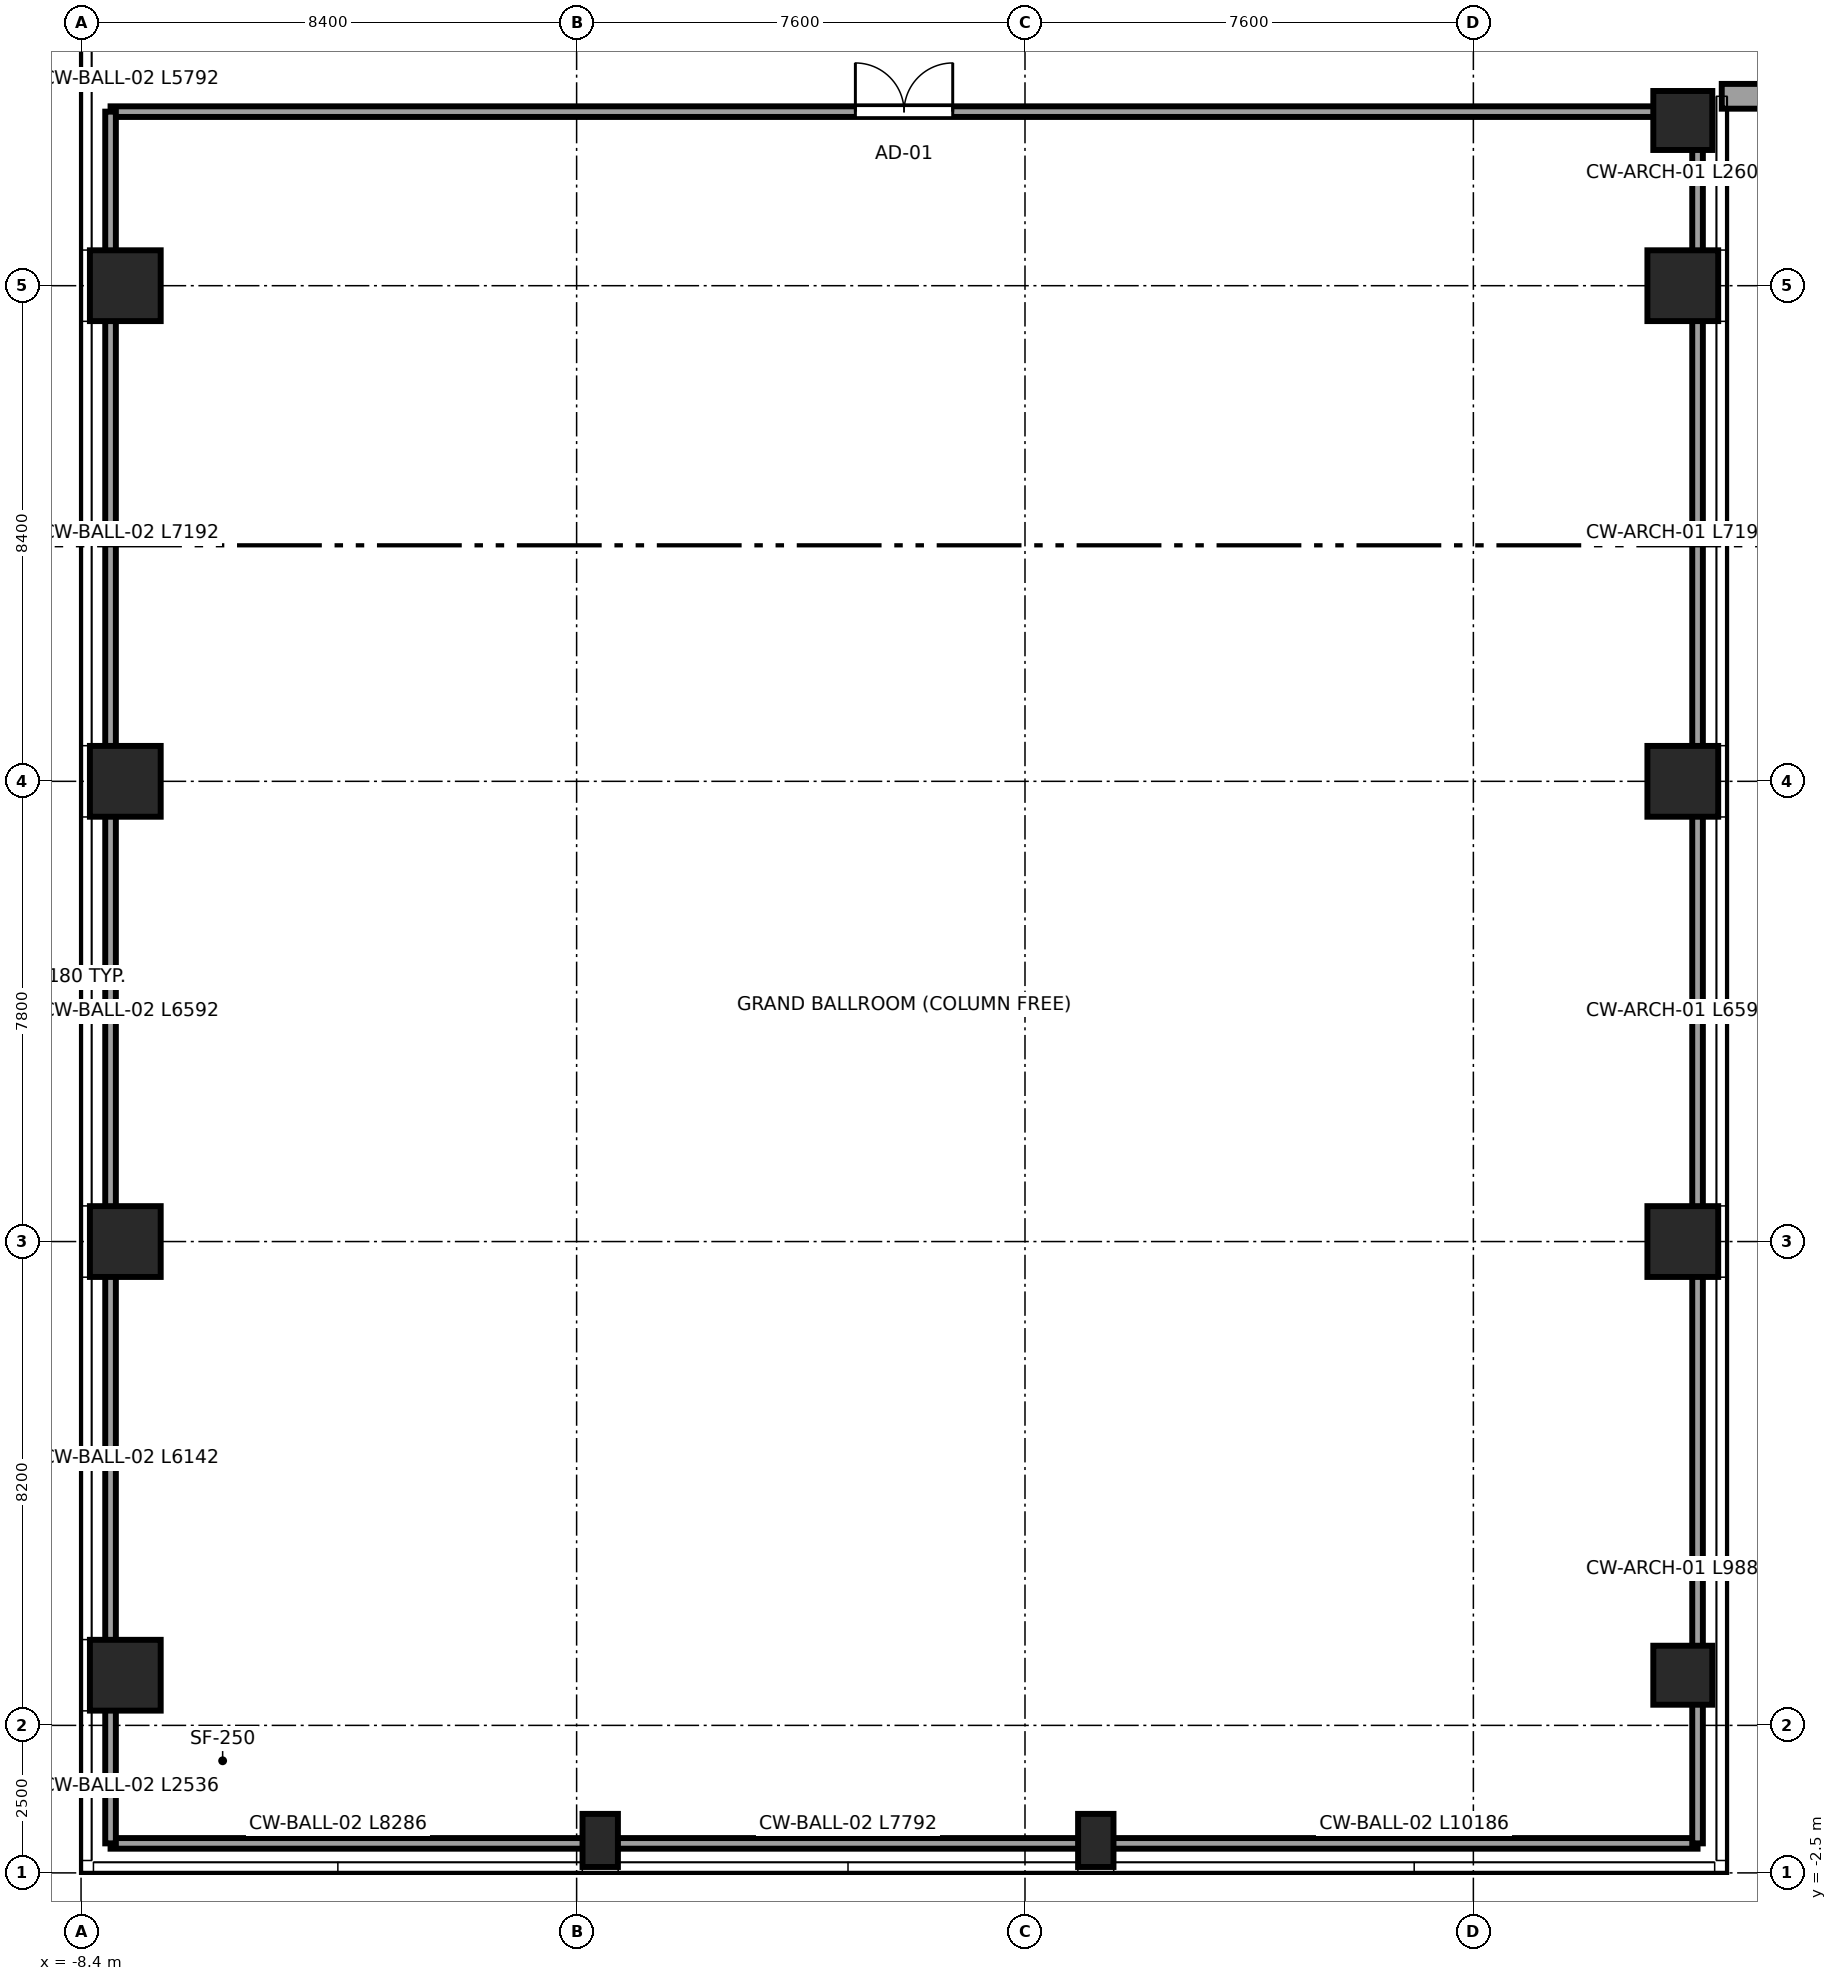
"""IFC4 building model, lengths in metres.
Left out: names, types, materials, properties, quantities, classifications, styles, units other than length and angle.
Written with IfcOpenShell. Run it as: python <this file> out.ifc"""

import sys

from ifc_helpers import new_model, si_unit, direction, frame, frame_2d, origin, origin_2d, place, context, subcontext, project, spatial, rectangle, circle, extrude, source, transform, mapped, element, fill, save


model = new_model("IFC4")
c1 = context("Model", 3, precision=1e-05, world=origin(), true_north=direction((0.0, 1.0)))
c2 = subcontext(c1, "Body", "Model", "MODEL_VIEW")
j1 = project(units=[si_unit("LENGTHUNIT", "METRE"), si_unit("PLANEANGLEUNIT", "RADIAN")], contexts=[c1])
p1 = place(None, origin())
s1 = spatial("IfcSite", under=j1, at=p1, CompositionType="ELEMENT")
p2 = place(p1, origin())
s2 = spatial("IfcBuilding", under=s1, at=p2, CompositionType="ELEMENT")
p3 = place(p2, frame((0.0, 0.0, 16.0)))
s3 = spatial("IfcBuildingStorey", under=s2, at=p3, CompositionType="ELEMENT", Elevation=16.0)
m1 = source(origin(), c2, "Body", "SweptSolid", [
    extrude(rectangle(XDim=1.2, YDim=1.2, at=origin_2d()), origin(), (0.0, 0.0, 1.0), 6.4),
])
for number, where, z_axis, x_axis in (
    (1, (-7.65, 0.85, 0.0), (0.0, 0.0, 1.0), (1.0, 0.0, 0.0)),
    (2, (-7.65, 8.2, 0.0), (0.0, 0.0, 1.0), (1.0, 0.0, 0.0)),
    (3, (-7.65, 16.0, 0.0), (0.0, 0.0, 1.0), (1.0, 0.0, 0.0)),
    (4, (-7.65, 24.4, 0.0), (0.0, 0.0, 1.0), (1.0, 0.0, 0.0)),
):
    element("IfcColumn", number, at=place(p3, frame(where, z_axis=z_axis, x_axis=x_axis)), inside=s3, PredefinedType="COLUMN", context=c2, shape_type="MappedRepresentation", body=[
        mapped(m1, transform((0.0, 0.0, 0.0), x_axis=(1.0, 0.0, 0.0), y_axis=(0.0, 1.0, 0.0), z_axis=(0.0, 0.0, 1.0), scale=1.0)),
    ])
m2 = source(origin(), c2, "Body", "SweptSolid", [
    extrude(circle(Radius=0.5, at=origin_2d()), origin(), (0.0, 0.0, 1.0), 6.4),
])
p4 = place(p3, frame((18.75, 0.85, 0.0), z_axis=(0.0, 0.0, 1.0), x_axis=(1.0, 0.0, 0.0)))
e5 = element("IfcColumn", 5, at=p4, inside=s3, PredefinedType="COLUMN", context=c2, shape_type="MappedRepresentation", body=[
    mapped(m2, transform((0.0, 0.0, 0.0), x_axis=(1.0, 0.0, 0.0), y_axis=(0.0, 1.0, 0.0), z_axis=(0.0, 0.0, 1.0), scale=1.0)),
])
for number, where, z_axis, x_axis in (
    (6, (18.75, 8.2, 0.0), (0.0, 0.0, 1.0), (1.0, 0.0, 0.0)),
    (7, (18.75, 16.0, 0.0), (0.0, 0.0, 1.0), (1.0, 0.0, 0.0)),
    (8, (18.75, 24.4, 0.0), (0.0, 0.0, 1.0), (1.0, 0.0, 0.0)),
):
    element("IfcColumn", number, at=place(p3, frame(where, z_axis=z_axis, x_axis=x_axis)), inside=s3, PredefinedType="COLUMN", context=c2, shape_type="MappedRepresentation", body=[
        mapped(m1, transform((0.0, 0.0, 0.0), x_axis=(1.0, 0.0, 0.0), y_axis=(0.0, 1.0, 0.0), z_axis=(0.0, 0.0, 1.0), scale=1.0)),
    ])
p5 = place(p3, frame((18.75, 27.2, 0.0), z_axis=(0.0, 0.0, 1.0), x_axis=(1.0, 0.0, 0.0)))
e9 = element("IfcColumn", 9, at=p5, inside=s3, PredefinedType="COLUMN", context=c2, shape_type="MappedRepresentation", body=[
    mapped(m2, transform((0.0, 0.0, 0.0), x_axis=(1.0, 0.0, 0.0), y_axis=(0.0, 1.0, 0.0), z_axis=(0.0, 0.0, 1.0), scale=1.0)),
])
m3 = source(origin(), c2, "Body", "SweptSolid", [
    extrude(rectangle(XDim=0.6, YDim=0.9, at=origin_2d()), origin(), (0.0, 0.0, 1.0), 6.4),
])
for number, where, z_axis, x_axis in (
    (10, (0.4, -1.95, 0.0), (0.0, 0.0, 1.0), (1.0, 0.0, 0.0)),
    (11, (8.8, -1.95, 0.0), (0.0, 0.0, 1.0), (1.0, 0.0, 0.0)),
):
    element("IfcColumn", number, at=place(p3, frame(where, z_axis=z_axis, x_axis=x_axis)), inside=s3, PredefinedType="PILASTER", context=c2, shape_type="MappedRepresentation", body=[
        mapped(m3, transform((0.0, 0.0, 0.0), x_axis=(1.0, 0.0, 0.0), y_axis=(0.0, 1.0, 0.0), z_axis=(0.0, 0.0, 1.0), scale=1.0)),
    ])
p6 = place(p3, frame((19.41, 27.61, 0.0), z_axis=(0.0, 0.0, 1.0), x_axis=(1.0, 0.0, 0.0)))
e12 = element("IfcWall", 12, at=p6, inside=s3, PredefinedType="SOLIDWALL", context=c2, shape_type="SweptSolid", body=[
    extrude(rectangle(XDim=18.18, YDim=0.42, at=frame_2d((9.09, 0.0))), origin(), (0.0, 0.0, 1.0), 3.73),
])
p7 = place(p6, frame((1.93, 0.0, 0.65)))
e13 = element("IfcOpeningElement", 13, at=p7, cuts=e12, PredefinedType="OPENING", context=c2, shape_type="SweptSolid", body=[
    extrude(rectangle(XDim=3.0, YDim=2.5, at=frame_2d((1.5, 1.25))), frame((0.0, 0.22, 0.0), z_axis=(0.0, -1.0, 0.0), x_axis=(1.0, 0.0, 0.0)), (0.0, 0.0, 1.0), 0.44),
])
p8 = place(p6, frame((7.59, 0.0, 0.65)))
e14 = element("IfcOpeningElement", 14, at=p8, cuts=e12, PredefinedType="OPENING", context=c2, shape_type="SweptSolid", body=[
    extrude(rectangle(XDim=3.0, YDim=2.5, at=frame_2d((1.5, 1.25))), frame((0.0, 0.22, 0.0), z_axis=(0.0, -1.0, 0.0), x_axis=(1.0, 0.0, 0.0)), (0.0, 0.0, 1.0), 0.44),
])
p9 = place(p6, frame((13.25, 0.0, 0.65)))
e15 = element("IfcOpeningElement", 15, at=p9, cuts=e12, PredefinedType="OPENING", context=c2, shape_type="SweptSolid", body=[
    extrude(rectangle(XDim=3.0, YDim=2.5, at=frame_2d((1.5, 1.25))), frame((0.0, 0.22, 0.0), z_axis=(0.0, -1.0, 0.0), x_axis=(1.0, 0.0, 0.0)), (0.0, 0.0, 1.0), 0.44),
])
p10 = place(p3, frame((-7.9, -2.0, 0.0), z_axis=(0.0, 0.0, 1.0), x_axis=(1.0, 0.0, 0.0)))
e16 = element("IfcWall", 16, at=p10, inside=s3, PredefinedType="PARTITIONING", context=c2, shape_type="SweptSolid", body=[
    extrude(rectangle(XDim=26.9, YDim=0.18, at=frame_2d((13.45, 0.0))), origin(), (0.0, 0.0, 1.0), 5.43),
])
p11 = place(p3, frame((-7.9, 27.35, 0.0), z_axis=(0.0, 0.0, 1.0), x_axis=(1.0, 0.0, 0.0)))
e17 = element("IfcWall", 17, at=p11, inside=s3, PredefinedType="PARTITIONING", context=c2, shape_type="SweptSolid", body=[
    extrude(rectangle(XDim=26.9, YDim=0.18, at=frame_2d((13.45, 0.0))), origin(), (0.0, 0.0, 1.0), 3.73),
])
p12 = place(p11, frame((12.625, 0.0, 0.0)))
e18 = element("IfcOpeningElement", 18, at=p12, cuts=e17, PredefinedType="OPENING", context=c2, shape_type="SweptSolid", body=[
    extrude(rectangle(XDim=1.65, YDim=2.15, at=frame_2d((0.825, 1.075))), frame((0.0, 0.1, 0.0), z_axis=(0.0, -1.0, 0.0), x_axis=(1.0, 0.0, 0.0)), (0.0, 0.0, 1.0), 0.2),
])
for number, where, z_axis, x_axis in (
    (19, (-7.9, -2.0, 0.0), (0.0, 0.0, 1.0), (0.0, 1.0, 0.0)),
    (20, (19.0, -2.0, 0.0), (0.0, 0.0, 1.0), (0.0, 1.0, 0.0)),
):
    element("IfcWall", number, at=place(p3, frame(where, z_axis=z_axis, x_axis=x_axis)), inside=s3, PredefinedType="PARTITIONING", context=c2, shape_type="SweptSolid", body=[
        extrude(rectangle(XDim=29.35, YDim=0.18, at=frame_2d((14.675, 0.0))), origin(), (0.0, 0.0, 1.0), 6.14),
    ])
m4 = source(origin(), c2, "Body", "SweptSolid", [
    extrude(rectangle(XDim=1.65, YDim=2.15, at=frame_2d((0.825, 1.075))), frame((0.0, 0.025, 0.0), z_axis=(0.0, -1.0, 0.0), x_axis=(1.0, 0.0, 0.0)), (0.0, 0.0, 1.0), 0.05),
])
p13 = place(p12, origin())
e21 = element("IfcDoor", 21, at=p13, inside=s3, OperationType="DOUBLE_DOOR_SINGLE_SWING", PredefinedType="DOOR", context=c2, shape_type="MappedRepresentation", body=[
    mapped(m4, transform((0.0, 0.0, 0.0), x_axis=(1.0, 0.0, 0.0), y_axis=(0.0, 1.0, 0.0), z_axis=(0.0, 0.0, 1.0), scale=1.0)),
])
fill(e18, e21)
save(model, sys.argv[1])
